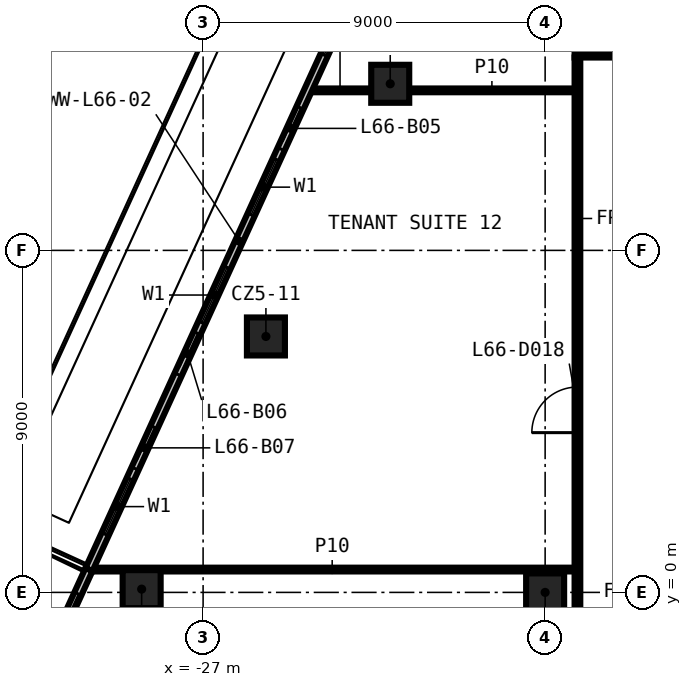
"""IFC4 building model, lengths in metres.
Left out: names, types, materials, properties, quantities, classifications, styles, units other than length and angle.
Written with IfcOpenShell. Run it as: python <this file> out.ifc"""

import sys

from ifc_helpers import new_model, si_unit, direction, frame, frame_2d, origin, origin_2d, place, context, subcontext, project, spatial, rectangle, extrude, element, fill, save


model = new_model("IFC4")
c1 = context("Model", 3, precision=1e-05, world=origin(), true_north=direction((0.0, 1.0)))
c2 = subcontext(c1, "Body", "Model", "MODEL_VIEW")
j1 = project(units=[si_unit("LENGTHUNIT", "METRE"), si_unit("PLANEANGLEUNIT", "RADIAN")], contexts=[c1])
p1 = place(None, origin())
s1 = spatial("IfcSite", under=j1, at=p1, CompositionType="ELEMENT")
p2 = place(p1, origin())
s2 = spatial("IfcBuilding", under=s1, at=p2, CompositionType="ELEMENT")
p3 = place(p2, frame((0.0, 0.0, 311.0)))
s3 = spatial("IfcBuildingStorey", under=s2, at=p3, CompositionType="ELEMENT", Elevation=311.0)
for number, where, z_axis, x_axis in (
    (1, (-28.617, 0.086, 0.0), (0.0, 0.0, 1.0), (1.0, 0.0, 0.0)),
    (2, (-25.347, 6.735, 0.0), (0.0, 0.0, 1.0), (1.0, 0.0, 0.0)),
    (3, (-22.076, 13.384, 0.0), (0.0, 0.0, 1.0), (1.0, 0.0, 0.0)),
    (4, (-18.0, 0.0, 0.0), (0.0, 0.0, 1.0), (1.0, 0.0, 0.0)),
):
    element("IfcColumn", number, at=place(p3, frame(where, z_axis=z_axis, x_axis=x_axis)), inside=s3, PredefinedType="COLUMN", context=c2, shape_type="SweptSolid", body=[
        extrude(rectangle(XDim=1.0, YDim=1.0, at=origin_2d()), origin(), (0.0, 0.0, 1.0), 3.82),
    ])
p4 = place(p3, frame((-29.981, 0.601, 0.0), z_axis=(0.0, 0.0, 1.0), x_axis=(1.0, 0.0, 0.0)))
e5 = element("IfcWall", 5, at=p4, inside=s3, PredefinedType="PARTITIONING", context=c2, shape_type="SweptSolid", body=[
    extrude(rectangle(XDim=12.756, YDim=0.1, at=frame_2d((6.378, 0.0))), origin(), (0.0, 0.0, 1.0), 3.82),
])
p5 = place(p3, frame((-24.218, 13.211, 0.0), z_axis=(0.0, 0.0, 1.0), x_axis=(1.0, 0.0, 0.0)))
e6 = element("IfcWall", 6, at=p5, inside=s3, PredefinedType="PARTITIONING", context=c2, shape_type="SweptSolid", body=[
    extrude(rectangle(XDim=1.642, YDim=0.1, at=frame_2d((0.821, 0.0))), origin(), (0.0, 0.0, 1.0), 3.82),
])
p6 = place(p3, frame((-21.576, 13.211, 0.0), z_axis=(0.0, 0.0, 1.0), x_axis=(1.0, 0.0, 0.0)))
e7 = element("IfcWall", 7, at=p6, inside=s3, PredefinedType="PARTITIONING", context=c2, shape_type="SweptSolid", body=[
    extrude(rectangle(XDim=4.351, YDim=0.1, at=frame_2d((2.175, 0.0))), origin(), (0.0, 0.0, 1.0), 3.82),
])
p7 = place(p3, frame((-17.225, 14.15, 0.0), z_axis=(0.0, 0.0, 1.0), x_axis=(1.0, 0.0, 0.0)))
e8 = element("IfcWall", 8, at=p7, inside=s3, PredefinedType="PARTITIONING", context=c2, shape_type="SweptSolid", body=[
    extrude(rectangle(XDim=34.45, YDim=0.15, at=frame_2d((17.225, 0.0))), origin(), (0.0, 0.0, 1.0), 3.82),
])
p8 = place(p7, frame((31.607, 0.0, 0.0)))
e9 = element("IfcOpeningElement", 9, at=p8, cuts=e8, PredefinedType="OPENING", context=c2, shape_type="SweptSolid", body=[
    extrude(rectangle(XDim=1.2, YDim=2.1, at=frame_2d((0.6, 1.05))), frame((0.0, 0.085, 0.0), z_axis=(0.0, -1.0, 0.0), x_axis=(1.0, 0.0, 0.0)), (0.0, 0.0, 1.0), 0.17),
])
p9 = place(p7, frame((25.936, 0.0, 0.0)))
e10 = element("IfcOpeningElement", 10, at=p9, cuts=e8, PredefinedType="OPENING", context=c2, shape_type="SweptSolid", body=[
    extrude(rectangle(XDim=1.2, YDim=2.1, at=frame_2d((0.6, 1.05))), frame((0.0, 0.085, 0.0), z_axis=(0.0, -1.0, 0.0), x_axis=(1.0, 0.0, 0.0)), (0.0, 0.0, 1.0), 0.17),
])
p10 = place(p7, frame((17.707, 0.0, 0.0)))
e11 = element("IfcOpeningElement", 11, at=p10, cuts=e8, PredefinedType="OPENING", context=c2, shape_type="SweptSolid", body=[
    extrude(rectangle(XDim=1.2, YDim=2.1, at=frame_2d((0.6, 1.05))), frame((0.0, 0.085, 0.0), z_axis=(0.0, -1.0, 0.0), x_axis=(1.0, 0.0, 0.0)), (0.0, 0.0, 1.0), 0.17),
])
p11 = place(p7, frame((10.617, 0.0, 0.0)))
e12 = element("IfcOpeningElement", 12, at=p11, cuts=e8, PredefinedType="OPENING", context=c2, shape_type="SweptSolid", body=[
    extrude(rectangle(XDim=1.2, YDim=2.1, at=frame_2d((0.6, 1.05))), frame((0.0, 0.085, 0.0), z_axis=(0.0, -1.0, 0.0), x_axis=(1.0, 0.0, 0.0)), (0.0, 0.0, 1.0), 0.17),
])
p12 = place(p7, frame((5.896, 0.0, 0.0)))
e13 = element("IfcOpeningElement", 13, at=p12, cuts=e8, PredefinedType="OPENING", context=c2, shape_type="SweptSolid", body=[
    extrude(rectangle(XDim=1.2, YDim=2.1, at=frame_2d((0.6, 1.05))), frame((0.0, 0.085, 0.0), z_axis=(0.0, -1.0, 0.0), x_axis=(1.0, 0.0, 0.0)), (0.0, 0.0, 1.0), 0.17),
])
p13 = place(p7, frame((1.506, 0.0, 0.0)))
e14 = element("IfcOpeningElement", 14, at=p13, cuts=e8, PredefinedType="OPENING", context=c2, shape_type="SweptSolid", body=[
    extrude(rectangle(XDim=1.2, YDim=2.1, at=frame_2d((0.6, 1.05))), frame((0.0, 0.085, 0.0), z_axis=(0.0, -1.0, 0.0), x_axis=(1.0, 0.0, 0.0)), (0.0, 0.0, 1.0), 0.17),
])
p14 = place(p3, frame((-17.15, -14.075, 0.0), z_axis=(0.0, 0.0, 1.0), x_axis=(0.0, 1.0, 0.0)))
e15 = element("IfcWall", 15, at=p14, inside=s3, PredefinedType="PARTITIONING", context=c2, shape_type="SweptSolid", body=[
    extrude(rectangle(XDim=28.15, YDim=0.15, at=frame_2d((14.075, 0.0))), origin(), (0.0, 0.0, 1.0), 3.82),
])
p15 = place(p14, frame((10.867, 0.0, 0.0)))
e16 = element("IfcOpeningElement", 16, at=p15, cuts=e15, PredefinedType="OPENING", context=c2, shape_type="SweptSolid", body=[
    extrude(rectangle(XDim=1.2, YDim=2.1, at=frame_2d((0.6, 1.05))), frame((0.0, 0.085, 0.0), z_axis=(0.0, -1.0, 0.0), x_axis=(1.0, 0.0, 0.0)), (0.0, 0.0, 1.0), 0.17),
])
p16 = place(p14, frame((3.801, 0.0, 0.0)))
e17 = element("IfcOpeningElement", 17, at=p16, cuts=e15, PredefinedType="OPENING", context=c2, shape_type="SweptSolid", body=[
    extrude(rectangle(XDim=1.2, YDim=2.1, at=frame_2d((0.6, 1.05))), frame((0.0, 0.085, 0.0), z_axis=(0.0, -1.0, 0.0), x_axis=(1.0, 0.0, 0.0)), (0.0, 0.0, 1.0), 0.17),
])
p17 = place(p14, frame((18.279, 0.0, 0.0)))
e18 = element("IfcOpeningElement", 18, at=p17, cuts=e15, PredefinedType="OPENING", context=c2, shape_type="SweptSolid", body=[
    extrude(rectangle(XDim=1.2, YDim=2.1, at=frame_2d((0.6, 1.05))), frame((0.0, 0.085, 0.0), z_axis=(0.0, -1.0, 0.0), x_axis=(1.0, 0.0, 0.0)), (0.0, 0.0, 1.0), 0.17),
])
p18 = place(p3, frame((-22.318, 17.414, 0.0), z_axis=(0.0, 0.0, 1.0), x_axis=(-0.415710447513, -0.909497016943, 0.0)))
e19 = element("IfcWall", 19, at=p18, inside=s3, PredefinedType="SOLIDWALL", context=c2, shape_type="SweptSolid", body=[
    extrude(rectangle(XDim=18.487, YDim=0.2, at=frame_2d((9.243, 0.0))), origin(), (0.0, 0.0, 1.0), 3.82),
])
p19 = place(p18, frame((2.0, 0.0, 0.6)))
e20 = element("IfcOpeningElement", 20, at=p19, cuts=e19, PredefinedType="OPENING", context=c2, shape_type="SweptSolid", body=[
    extrude(rectangle(XDim=1.6, YDim=2.4, at=frame_2d((0.8, 1.2))), frame((0.0, 0.11, 0.0), z_axis=(0.0, -1.0, 0.0), x_axis=(1.0, 0.0, 0.0)), (0.0, 0.0, 1.0), 0.22),
])
p20 = place(p18, frame((0.5, 0.0, 0.0)))
e21 = element("IfcOpeningElement", 21, at=p20, cuts=e19, PredefinedType="OPENING", context=c2, shape_type="SweptSolid", body=[
    extrude(rectangle(XDim=1.2, YDim=2.4, at=frame_2d((0.6, 1.2))), frame((0.0, 0.11, 0.0), z_axis=(0.0, -1.0, 0.0), x_axis=(1.0, 0.0, 0.0)), (0.0, 0.0, 1.0), 0.22),
])
p21 = place(p18, frame((6.622, 0.0, 0.6)))
e22 = element("IfcOpeningElement", 22, at=p21, cuts=e19, PredefinedType="OPENING", context=c2, shape_type="SweptSolid", body=[
    extrude(rectangle(XDim=1.6, YDim=2.4, at=frame_2d((0.8, 1.2))), frame((0.0, 0.11, 0.0), z_axis=(0.0, -1.0, 0.0), x_axis=(1.0, 0.0, 0.0)), (0.0, 0.0, 1.0), 0.22),
])
p22 = place(p18, frame((5.122, 0.0, 0.0)))
e23 = element("IfcOpeningElement", 23, at=p22, cuts=e19, PredefinedType="OPENING", context=c2, shape_type="SweptSolid", body=[
    extrude(rectangle(XDim=1.2, YDim=2.4, at=frame_2d((0.6, 1.2))), frame((0.0, 0.11, 0.0), z_axis=(0.0, -1.0, 0.0), x_axis=(1.0, 0.0, 0.0)), (0.0, 0.0, 1.0), 0.22),
])
p23 = place(p18, frame((9.743, 0.0, 0.6)))
e24 = element("IfcOpeningElement", 24, at=p23, cuts=e19, PredefinedType="OPENING", context=c2, shape_type="SweptSolid", body=[
    extrude(rectangle(XDim=1.6, YDim=2.4, at=frame_2d((0.8, 1.2))), frame((0.0, 0.11, 0.0), z_axis=(0.0, -1.0, 0.0), x_axis=(1.0, 0.0, 0.0)), (0.0, 0.0, 1.0), 0.22),
])
p24 = place(p18, frame((11.643, 0.0, 0.0)))
e25 = element("IfcOpeningElement", 25, at=p24, cuts=e19, PredefinedType="OPENING", context=c2, shape_type="SweptSolid", body=[
    extrude(rectangle(XDim=1.2, YDim=2.4, at=frame_2d((0.6, 1.2))), frame((0.0, 0.11, 0.0), z_axis=(0.0, -1.0, 0.0), x_axis=(1.0, 0.0, 0.0)), (0.0, 0.0, 1.0), 0.22),
])
p25 = place(p18, frame((15.865, 0.0, 0.6)))
e26 = element("IfcOpeningElement", 26, at=p25, cuts=e19, PredefinedType="OPENING", context=c2, shape_type="SweptSolid", body=[
    extrude(rectangle(XDim=1.6, YDim=2.4, at=frame_2d((0.8, 1.2))), frame((0.0, 0.11, 0.0), z_axis=(0.0, -1.0, 0.0), x_axis=(1.0, 0.0, 0.0)), (0.0, 0.0, 1.0), 0.22),
])
p26 = place(p18, frame((14.365, 0.0, 0.0)))
e27 = element("IfcOpeningElement", 27, at=p26, cuts=e19, PredefinedType="OPENING", context=c2, shape_type="SweptSolid", body=[
    extrude(rectangle(XDim=1.2, YDim=2.4, at=frame_2d((0.6, 1.2))), frame((0.0, 0.11, 0.0), z_axis=(0.0, -1.0, 0.0), x_axis=(1.0, 0.0, 0.0)), (0.0, 0.0, 1.0), 0.22),
])
p27 = place(p3, frame((-30.003, 0.601, 0.0), z_axis=(0.0, 0.0, 1.0), x_axis=(-0.415728482872, -0.909488773174, 0.0)))
e28 = element("IfcWall", 28, at=p27, inside=s3, PredefinedType="SOLIDWALL", context=c2, shape_type="SweptSolid", body=[
    extrude(rectangle(XDim=4.612, YDim=0.2, at=frame_2d((2.306, 0.0))), origin(), (0.0, 0.0, 1.0), 3.82),
])
p28 = place(p27, frame((2.2, 0.0, 0.6)))
e29 = element("IfcOpeningElement", 29, at=p28, cuts=e28, PredefinedType="OPENING", context=c2, shape_type="SweptSolid", body=[
    extrude(rectangle(XDim=1.6, YDim=2.4, at=frame_2d((0.8, 1.2))), frame((0.0, 0.11, 0.0), z_axis=(0.0, -1.0, 0.0), x_axis=(1.0, 0.0, 0.0)), (0.0, 0.0, 1.0), 0.22),
])
p29 = place(p27, frame((0.7, 0.0, 0.0)))
e30 = element("IfcOpeningElement", 30, at=p29, cuts=e28, PredefinedType="OPENING", context=c2, shape_type="SweptSolid", body=[
    extrude(rectangle(XDim=1.2, YDim=2.4, at=frame_2d((0.6, 1.2))), frame((0.0, 0.11, 0.0), z_axis=(0.0, -1.0, 0.0), x_axis=(1.0, 0.0, 0.0)), (0.0, 0.0, 1.0), 0.22),
])
p30 = place(p17, origin())
e31 = element("IfcDoor", 31, at=p30, inside=s3, OperationType="SINGLE_SWING_LEFT", PredefinedType="DOOR", context=c2, shape_type="SweptSolid", body=[
    extrude(rectangle(XDim=1.2, YDim=2.1, at=frame_2d((0.6, 1.05))), frame((0.0, 0.025, 0.0), z_axis=(0.0, -1.0, 0.0), x_axis=(1.0, 0.0, 0.0)), (0.0, 0.0, 1.0), 0.05),
])
fill(e18, e31)
p31 = place(p19, origin())
e32 = element("IfcWindow", 32, at=p31, inside=s3, PartitioningType="SINGLE_PANEL", PredefinedType="WINDOW", context=c2, shape_type="SweptSolid", body=[
    extrude(rectangle(XDim=1.6, YDim=2.4, at=frame_2d((0.8, 1.2))), frame((0.0, 0.03, 0.0), z_axis=(0.0, -1.0, 0.0), x_axis=(1.0, 0.0, 0.0)), (0.0, 0.0, 1.0), 0.06),
])
fill(e20, e32)
p32 = place(p21, origin())
e33 = element("IfcWindow", 33, at=p32, inside=s3, PartitioningType="SINGLE_PANEL", PredefinedType="WINDOW", context=c2, shape_type="SweptSolid", body=[
    extrude(rectangle(XDim=1.6, YDim=2.4, at=frame_2d((0.8, 1.2))), frame((0.0, 0.03, 0.0), z_axis=(0.0, -1.0, 0.0), x_axis=(1.0, 0.0, 0.0)), (0.0, 0.0, 1.0), 0.06),
])
fill(e22, e33)
p33 = place(p22, origin())
e34 = element("IfcDoor", 34, at=p33, inside=s3, OperationType="SLIDING_TO_LEFT", PredefinedType="DOOR", context=c2, shape_type="SweptSolid", body=[
    extrude(rectangle(XDim=1.2, YDim=2.4, at=frame_2d((0.6, 1.2))), frame((0.0, 0.025, 0.0), z_axis=(0.0, -1.0, 0.0), x_axis=(1.0, 0.0, 0.0)), (0.0, 0.0, 1.0), 0.05),
])
fill(e23, e34)
p34 = place(p23, origin())
e35 = element("IfcWindow", 35, at=p34, inside=s3, PartitioningType="SINGLE_PANEL", PredefinedType="WINDOW", context=c2, shape_type="SweptSolid", body=[
    extrude(rectangle(XDim=1.6, YDim=2.4, at=frame_2d((0.8, 1.2))), frame((0.0, 0.03, 0.0), z_axis=(0.0, -1.0, 0.0), x_axis=(1.0, 0.0, 0.0)), (0.0, 0.0, 1.0), 0.06),
])
fill(e24, e35)
p35 = place(p24, origin())
e36 = element("IfcDoor", 36, at=p35, inside=s3, OperationType="SLIDING_TO_LEFT", PredefinedType="DOOR", context=c2, shape_type="SweptSolid", body=[
    extrude(rectangle(XDim=1.2, YDim=2.4, at=frame_2d((0.6, 1.2))), frame((0.0, 0.025, 0.0), z_axis=(0.0, -1.0, 0.0), x_axis=(1.0, 0.0, 0.0)), (0.0, 0.0, 1.0), 0.05),
])
fill(e25, e36)
p36 = place(p25, origin())
e37 = element("IfcWindow", 37, at=p36, inside=s3, PartitioningType="SINGLE_PANEL", PredefinedType="WINDOW", context=c2, shape_type="SweptSolid", body=[
    extrude(rectangle(XDim=1.6, YDim=2.4, at=frame_2d((0.8, 1.2))), frame((0.0, 0.03, 0.0), z_axis=(0.0, -1.0, 0.0), x_axis=(1.0, 0.0, 0.0)), (0.0, 0.0, 1.0), 0.06),
])
fill(e26, e37)
p37 = place(p26, origin())
e38 = element("IfcDoor", 38, at=p37, inside=s3, OperationType="SLIDING_TO_LEFT", PredefinedType="DOOR", context=c2, shape_type="SweptSolid", body=[
    extrude(rectangle(XDim=1.2, YDim=2.4, at=frame_2d((0.6, 1.2))), frame((0.0, 0.025, 0.0), z_axis=(0.0, -1.0, 0.0), x_axis=(1.0, 0.0, 0.0)), (0.0, 0.0, 1.0), 0.05),
])
fill(e27, e38)
p38 = place(p29, origin())
e39 = element("IfcDoor", 39, at=p38, inside=s3, OperationType="SLIDING_TO_LEFT", PredefinedType="DOOR", context=c2, shape_type="SweptSolid", body=[
    extrude(rectangle(XDim=1.2, YDim=2.4, at=frame_2d((0.6, 1.2))), frame((0.0, 0.025, 0.0), z_axis=(0.0, -1.0, 0.0), x_axis=(1.0, 0.0, 0.0)), (0.0, 0.0, 1.0), 0.05),
])
fill(e30, e39)
save(model, sys.argv[1])
